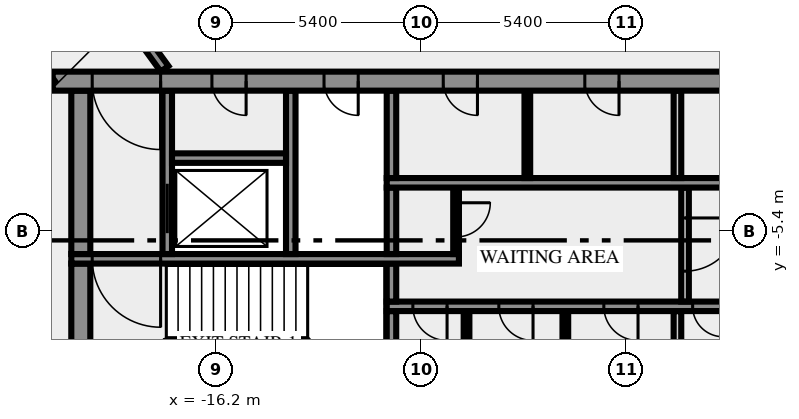
"""IFC4 building model, lengths in metres.
Left out: names, types, materials, properties, quantities, classifications, styles, units other than length and angle.
Written with IfcOpenShell. Run it as: python <this file> out.ifc"""

import sys

from ifc_helpers import new_model, si_unit, direction, frame, frame_2d, origin, place, context, subcontext, project, spatial, rectangle, extrude, element, fill, save


model = new_model("IFC4")
c1 = context("Model", 3, precision=1e-05, world=origin(), true_north=direction((0.0, 1.0)))
c2 = subcontext(c1, "Body", "Model", "MODEL_VIEW")
j1 = project(units=[si_unit("LENGTHUNIT", "METRE"), si_unit("PLANEANGLEUNIT", "RADIAN")], contexts=[c1])
p1 = place(None, origin())
s1 = spatial("IfcSite", under=j1, at=p1, CompositionType="ELEMENT")
p2 = place(p1, origin())
s2 = spatial("IfcBuilding", under=s1, at=p2, CompositionType="ELEMENT")
p3 = place(p2, frame((0.0, 0.0, 148.0)))
s3 = spatial("IfcBuildingStorey", under=s2, at=p3, CompositionType="ELEMENT", Elevation=148.0)
p4 = place(p3, frame((-19.75, -10.5, 0.0), z_axis=(0.0, 0.0, 1.0), x_axis=(0.0, 1.0, 0.0)))
e1 = element("IfcWall", 1, at=p4, inside=s3, PredefinedType="SHEAR", context=c2, shape_type="SweptSolid", body=[
    extrude(rectangle(XDim=4.25, YDim=0.5, at=frame_2d((2.125, 0.0))), origin(), (0.0, 0.0, 1.0), 3.65),
])
p5 = place(p3, frame((-11.575, -10.5, 0.0), z_axis=(0.0, 0.0, 1.0), x_axis=(0.0, 1.0, 0.0)))
e2 = element("IfcWall", 2, at=p5, inside=s3, PredefinedType="SHEAR", context=c2, shape_type="SweptSolid", body=[
    extrude(rectangle(XDim=3.0, YDim=0.25, at=frame_2d((1.5, 0.0))), origin(), (0.0, 0.0, 1.0), 3.65),
])
for number, where, z_axis, x_axis in (
    (3, (-9.6, -10.5, 0.0), (0.0, 0.0, 1.0), (0.0, 1.0, 0.0)),
    (4, (-7.0, -10.5, 0.0), (0.0, 0.0, 1.0), (0.0, 1.0, 0.0)),
):
    element("IfcWall", number, at=place(p3, frame(where, z_axis=z_axis, x_axis=x_axis)), inside=s3, PredefinedType="PARTITIONING", context=c2, shape_type="SweptSolid", body=[
        extrude(rectangle(XDim=3.0, YDim=0.15, at=frame_2d((1.5, 0.0))), origin(), (0.0, 0.0, 1.0), 3.65),
    ])
p6 = place(p3, frame((-4.05, -10.5, 0.0), z_axis=(0.0, 0.0, 1.0), x_axis=(0.0, 1.0, 0.0)))
e5 = element("IfcWall", 5, at=p6, inside=s3, PredefinedType="SOLIDWALL", context=c2, shape_type="SweptSolid", body=[
    extrude(rectangle(XDim=3.0, YDim=0.2, at=frame_2d((1.5, 0.0))), origin(), (0.0, 0.0, 1.0), 3.65),
])
p7 = place(p3, frame((11.7, -7.375, 0.0), z_axis=(0.0, 0.0, 1.0), x_axis=(-1.0, 0.0, 0.0)))
e6 = element("IfcWall", 6, at=p7, inside=s3, PredefinedType="SHEAR", context=c2, shape_type="SweptSolid", body=[
    extrude(rectangle(XDim=23.4, YDim=0.25, at=frame_2d((11.7, 0.0))), origin(), (0.0, 0.0, 1.0), 3.65),
])
p8 = place(p7, frame((21.812, 0.0, 0.0)))
e7 = element("IfcOpeningElement", 7, at=p8, cuts=e6, PredefinedType="OPENING", context=c2, shape_type="SweptSolid", body=[
    extrude(rectangle(XDim=0.9, YDim=2.1, at=frame_2d((0.45, 1.05))), frame((0.0, 0.135, 0.0), z_axis=(0.0, -1.0, 0.0), x_axis=(1.0, 0.0, 0.0)), (0.0, 0.0, 1.0), 0.27),
])
p9 = place(p7, frame((19.55, 0.0, 0.0)))
e8 = element("IfcOpeningElement", 8, at=p9, cuts=e6, PredefinedType="OPENING", context=c2, shape_type="SweptSolid", body=[
    extrude(rectangle(XDim=0.9, YDim=2.1, at=frame_2d((0.45, 1.05))), frame((0.0, 0.135, 0.0), z_axis=(0.0, -1.0, 0.0), x_axis=(1.0, 0.0, 0.0)), (0.0, 0.0, 1.0), 0.27),
])
p10 = place(p7, frame((16.787, 0.0, 0.0)))
e9 = element("IfcOpeningElement", 9, at=p10, cuts=e6, PredefinedType="OPENING", context=c2, shape_type="SweptSolid", body=[
    extrude(rectangle(XDim=0.9, YDim=2.1, at=frame_2d((0.45, 1.05))), frame((0.0, 0.135, 0.0), z_axis=(0.0, -1.0, 0.0), x_axis=(1.0, 0.0, 0.0)), (0.0, 0.0, 1.0), 0.27),
])
p11 = place(p7, frame((14.55, 0.0, 0.0)))
e10 = element("IfcOpeningElement", 10, at=p11, cuts=e6, PredefinedType="OPENING", context=c2, shape_type="SweptSolid", body=[
    extrude(rectangle(XDim=0.8, YDim=2.1, at=frame_2d((0.4, 1.05))), frame((0.0, 0.135, 0.0), z_axis=(0.0, -1.0, 0.0), x_axis=(1.0, 0.0, 0.0)), (0.0, 0.0, 1.0), 0.27),
])
p12 = place(p7, frame((12.8, 0.0, 0.0)))
e11 = element("IfcOpeningElement", 11, at=p12, cuts=e6, PredefinedType="OPENING", context=c2, shape_type="SweptSolid", body=[
    extrude(rectangle(XDim=0.9, YDim=2.1, at=frame_2d((0.45, 1.05))), frame((0.0, 0.135, 0.0), z_axis=(0.0, -1.0, 0.0), x_axis=(1.0, 0.0, 0.0)), (0.0, 0.0, 1.0), 0.27),
])
p13 = place(p7, frame((10.7, 0.0, 0.0)))
e12 = element("IfcOpeningElement", 12, at=p13, cuts=e6, PredefinedType="OPENING", context=c2, shape_type="SweptSolid", body=[
    extrude(rectangle(XDim=0.9, YDim=2.1, at=frame_2d((0.45, 1.05))), frame((0.0, 0.135, 0.0), z_axis=(0.0, -1.0, 0.0), x_axis=(1.0, 0.0, 0.0)), (0.0, 0.0, 1.0), 0.27),
])
p14 = place(p7, frame((8.35, 0.0, 0.0)))
e13 = element("IfcOpeningElement", 13, at=p14, cuts=e6, PredefinedType="OPENING", context=c2, shape_type="SweptSolid", body=[
    extrude(rectangle(XDim=1.1, YDim=2.1, at=frame_2d((0.55, 1.05))), frame((0.0, 0.135, 0.0), z_axis=(0.0, -1.0, 0.0), x_axis=(1.0, 0.0, 0.0)), (0.0, 0.0, 1.0), 0.27),
])
p15 = place(p7, frame((5.85, 0.0, 0.0)))
e14 = element("IfcOpeningElement", 14, at=p15, cuts=e6, PredefinedType="OPENING", context=c2, shape_type="SweptSolid", body=[
    extrude(rectangle(XDim=1.1, YDim=2.1, at=frame_2d((0.55, 1.05))), frame((0.0, 0.135, 0.0), z_axis=(0.0, -1.0, 0.0), x_axis=(1.0, 0.0, 0.0)), (0.0, 0.0, 1.0), 0.27),
])
p16 = place(p7, frame((3.35, 0.0, 0.0)))
e15 = element("IfcOpeningElement", 15, at=p16, cuts=e6, PredefinedType="OPENING", context=c2, shape_type="SweptSolid", body=[
    extrude(rectangle(XDim=1.1, YDim=2.1, at=frame_2d((0.55, 1.05))), frame((0.0, 0.135, 0.0), z_axis=(0.0, -1.0, 0.0), x_axis=(1.0, 0.0, 0.0)), (0.0, 0.0, 1.0), 0.27),
])
p17 = place(p7, frame((0.85, 0.0, 0.0)))
e16 = element("IfcOpeningElement", 16, at=p17, cuts=e6, PredefinedType="OPENING", context=c2, shape_type="SweptSolid", body=[
    extrude(rectangle(XDim=1.1, YDim=2.1, at=frame_2d((0.55, 1.05))), frame((0.0, 0.135, 0.0), z_axis=(0.0, -1.0, 0.0), x_axis=(1.0, 0.0, 0.0)), (0.0, 0.0, 1.0), 0.27),
])
p18 = place(p3, frame((-11.575, -7.25, 0.0), z_axis=(0.0, 0.0, 1.0), x_axis=(0.0, 1.0, 0.0)))
e17 = element("IfcWall", 17, at=p18, inside=s3, PredefinedType="SHEAR", context=c2, shape_type="SweptSolid", body=[
    extrude(rectangle(XDim=1.0, YDim=0.25, at=frame_2d((0.5, 0.0))), origin(), (0.0, 0.0, 1.0), 3.65),
])
p19 = place(p3, frame((-3.85, -4.25, 0.0), z_axis=(0.0, 0.0, 1.0), x_axis=(0.0, -1.0, 0.0)))
e18 = element("IfcWall", 18, at=p19, inside=s3, PredefinedType="SOLIDWALL", context=c2, shape_type="SweptSolid", body=[
    extrude(rectangle(XDim=3.0, YDim=0.2, at=frame_2d((1.5, 0.0))), origin(), (0.0, 0.0, 1.0), 3.65),
])
p20 = place(p19, frame((0.8, 0.0, 0.0)))
e19 = element("IfcOpeningElement", 19, at=p20, cuts=e18, PredefinedType="OPENING", context=c2, shape_type="SweptSolid", body=[
    extrude(rectangle(XDim=1.4, YDim=2.1, at=frame_2d((0.7, 1.05))), frame((0.0, 0.11, 0.0), z_axis=(0.0, -1.0, 0.0), x_axis=(1.0, 0.0, 0.0)), (0.0, 0.0, 1.0), 0.22),
])
p21 = place(p3, frame((-9.8, -6.125, 0.0), z_axis=(0.0, 0.0, 1.0), x_axis=(-1.0, 0.0, 0.0)))
e20 = element("IfcWall", 20, at=p21, inside=s3, PredefinedType="SHEAR", context=c2, shape_type="SweptSolid", body=[
    extrude(rectangle(XDim=10.2, YDim=0.25, at=frame_2d((5.1, 0.0))), origin(), (0.0, 0.0, 1.0), 3.65),
])
p22 = place(p21, frame((7.85, 0.0, 0.0)))
e21 = element("IfcOpeningElement", 21, at=p22, cuts=e20, PredefinedType="OPENING", context=c2, shape_type="SweptSolid", body=[
    extrude(rectangle(XDim=1.8, YDim=2.1, at=frame_2d((0.9, 1.05))), frame((0.0, 0.135, 0.0), z_axis=(0.0, -1.0, 0.0), x_axis=(1.0, 0.0, 0.0)), (0.0, 0.0, 1.0), 0.27),
])
p23 = place(p3, frame((-19.75, -6.0, 0.0), z_axis=(0.0, 0.0, 1.0), x_axis=(0.0, 1.0, 0.0)))
e22 = element("IfcWall", 22, at=p23, inside=s3, PredefinedType="SHEAR", context=c2, shape_type="SweptSolid", body=[
    extrude(rectangle(XDim=4.3, YDim=0.5, at=frame_2d((2.15, 0.0))), origin(), (0.0, 0.0, 1.0), 3.65),
])
p24 = place(p3, frame((-17.475, -6.0, 0.0), z_axis=(0.0, 0.0, 1.0), x_axis=(0.0, 1.0, 0.0)))
e23 = element("IfcWall", 23, at=p24, inside=s3, PredefinedType="SHEAR", context=c2, shape_type="SweptSolid", body=[
    extrude(rectangle(XDim=4.3, YDim=0.25, at=frame_2d((2.15, 0.0))), origin(), (0.0, 0.0, 1.0), 3.65),
])
p25 = place(p24, frame((0.55, 0.0, 0.0)))
e24 = element("IfcOpeningElement", 24, at=p25, cuts=e23, PredefinedType="OPENING", context=c2, shape_type="SweptSolid", body=[
    extrude(rectangle(XDim=1.3, YDim=2.1, at=frame_2d((0.65, 1.05))), frame((0.0, 0.135, 0.0), z_axis=(0.0, -1.0, 0.0), x_axis=(1.0, 0.0, 0.0)), (0.0, 0.0, 1.0), 0.27),
])
p26 = place(p3, frame((-14.225, -6.0, 0.0), z_axis=(0.0, 0.0, 1.0), x_axis=(0.0, 1.0, 0.0)))
e25 = element("IfcWall", 25, at=p26, inside=s3, PredefinedType="SHEAR", context=c2, shape_type="SweptSolid", body=[
    extrude(rectangle(XDim=4.3, YDim=0.25, at=frame_2d((2.15, 0.0))), origin(), (0.0, 0.0, 1.0), 3.65),
])
p27 = place(p3, frame((-11.575, -6.0, 0.0), z_axis=(0.0, 0.0, 1.0), x_axis=(0.0, 1.0, 0.0)))
e26 = element("IfcWall", 26, at=p27, inside=s3, PredefinedType="SHEAR", context=c2, shape_type="SweptSolid", body=[
    extrude(rectangle(XDim=1.75, YDim=0.25, at=frame_2d((0.875, 0.0))), origin(), (0.0, 0.0, 1.0), 3.65),
])
p28 = place(p3, frame((-9.875, -4.25, 0.0), z_axis=(0.0, 0.0, 1.0), x_axis=(0.0, -1.0, 0.0)))
e27 = element("IfcWall", 27, at=p28, inside=s3, PredefinedType="PARTITIONING", context=c2, shape_type="SweptSolid", body=[
    extrude(rectangle(XDim=1.75, YDim=0.15, at=frame_2d((0.875, 0.0))), origin(), (0.0, 0.0, 1.0), 3.65),
])
p29 = place(p28, frame((0.4, 0.0, 0.0)))
e28 = element("IfcOpeningElement", 28, at=p29, cuts=e27, PredefinedType="OPENING", context=c2, shape_type="SweptSolid", body=[
    extrude(rectangle(XDim=0.9, YDim=2.1, at=frame_2d((0.45, 1.05))), frame((0.0, 0.085, 0.0), z_axis=(0.0, -1.0, 0.0), x_axis=(1.0, 0.0, 0.0)), (0.0, 0.0, 1.0), 0.17),
])
p30 = place(p3, frame((-11.7, -4.125, 0.0), z_axis=(0.0, 0.0, 1.0), x_axis=(1.0, 0.0, 0.0)))
e29 = element("IfcWall", 29, at=p30, inside=s3, PredefinedType="SHEAR", context=c2, shape_type="SweptSolid", body=[
    extrude(rectangle(XDim=10.05, YDim=0.25, at=frame_2d((5.025, 0.0))), origin(), (0.0, 0.0, 1.0), 3.65),
])
p31 = place(p3, frame((-11.575, -4.0, 0.0), z_axis=(0.0, 0.0, 1.0), x_axis=(0.0, 1.0, 0.0)))
e30 = element("IfcWall", 30, at=p31, inside=s3, PredefinedType="SHEAR", context=c2, shape_type="SweptSolid", body=[
    extrude(rectangle(XDim=2.3, YDim=0.25, at=frame_2d((1.15, 0.0))), origin(), (0.0, 0.0, 1.0), 3.65),
])
p32 = place(p3, frame((-8.0, -4.0, 0.0), z_axis=(0.0, 0.0, 1.0), x_axis=(0.0, 1.0, 0.0)))
e31 = element("IfcWall", 31, at=p32, inside=s3, PredefinedType="PARTITIONING", context=c2, shape_type="SweptSolid", body=[
    extrude(rectangle(XDim=2.3, YDim=0.15, at=frame_2d((1.15, 0.0))), origin(), (0.0, 0.0, 1.0), 3.65),
])
p33 = place(p3, frame((-4.05, -4.0, 0.0), z_axis=(0.0, 0.0, 1.0), x_axis=(0.0, 1.0, 0.0)))
e32 = element("IfcWall", 32, at=p33, inside=s3, PredefinedType="SOLIDWALL", context=c2, shape_type="SweptSolid", body=[
    extrude(rectangle(XDim=2.3, YDim=0.2, at=frame_2d((1.15, 0.0))), origin(), (0.0, 0.0, 1.0), 3.65),
])
p34 = place(p3, frame((-17.35, -3.475, 0.0), z_axis=(0.0, 0.0, 1.0), x_axis=(1.0, 0.0, 0.0)))
e33 = element("IfcWall", 33, at=p34, inside=s3, PredefinedType="SHEAR", context=c2, shape_type="SweptSolid", body=[
    extrude(rectangle(XDim=3.0, YDim=0.25, at=frame_2d((1.5, 0.0))), origin(), (0.0, 0.0, 1.0), 3.65),
])
p35 = place(p3, frame((20.49, -1.45, 0.0), z_axis=(0.0, 0.0, 1.0), x_axis=(-1.0, 0.0, 0.0)))
e34 = element("IfcWall", 34, at=p35, inside=s3, PredefinedType="SHEAR", context=c2, shape_type="SweptSolid", body=[
    extrude(rectangle(XDim=40.98, YDim=0.5, at=frame_2d((20.49, 0.0))), origin(), (0.0, 0.0, 1.0), 3.65),
])
p36 = place(p35, frame((38.14, 0.0, 0.0)))
e35 = element("IfcOpeningElement", 35, at=p36, cuts=e34, PredefinedType="OPENING", context=c2, shape_type="SweptSolid", body=[
    extrude(rectangle(XDim=1.8, YDim=2.1, at=frame_2d((0.9, 1.05))), frame((0.0, 0.26, 0.0), z_axis=(0.0, -1.0, 0.0), x_axis=(1.0, 0.0, 0.0)), (0.0, 0.0, 1.0), 0.52),
])
p37 = place(p35, frame((35.89, 0.0, 0.0)))
e36 = element("IfcOpeningElement", 36, at=p37, cuts=e34, PredefinedType="OPENING", context=c2, shape_type="SweptSolid", body=[
    extrude(rectangle(XDim=0.9, YDim=2.1, at=frame_2d((0.45, 1.05))), frame((0.0, 0.26, 0.0), z_axis=(0.0, -1.0, 0.0), x_axis=(1.0, 0.0, 0.0)), (0.0, 0.0, 1.0), 0.52),
])
p38 = place(p35, frame((32.94, 0.0, 0.0)))
e37 = element("IfcOpeningElement", 37, at=p38, cuts=e34, PredefinedType="OPENING", context=c2, shape_type="SweptSolid", body=[
    extrude(rectangle(XDim=0.9, YDim=2.1, at=frame_2d((0.45, 1.05))), frame((0.0, 0.26, 0.0), z_axis=(0.0, -1.0, 0.0), x_axis=(1.0, 0.0, 0.0)), (0.0, 0.0, 1.0), 0.52),
])
p39 = place(p35, frame((29.802, 0.0, 0.0)))
e38 = element("IfcOpeningElement", 38, at=p39, cuts=e34, PredefinedType="OPENING", context=c2, shape_type="SweptSolid", body=[
    extrude(rectangle(XDim=0.9, YDim=2.1, at=frame_2d((0.45, 1.05))), frame((0.0, 0.26, 0.0), z_axis=(0.0, -1.0, 0.0), x_axis=(1.0, 0.0, 0.0)), (0.0, 0.0, 1.0), 0.52),
])
p40 = place(p35, frame((26.077, 0.0, 0.0)))
e39 = element("IfcOpeningElement", 39, at=p40, cuts=e34, PredefinedType="OPENING", context=c2, shape_type="SweptSolid", body=[
    extrude(rectangle(XDim=0.9, YDim=2.1, at=frame_2d((0.45, 1.05))), frame((0.0, 0.26, 0.0), z_axis=(0.0, -1.0, 0.0), x_axis=(1.0, 0.0, 0.0)), (0.0, 0.0, 1.0), 0.52),
])
p41 = place(p35, frame((19.59, 0.0, 0.0)))
e40 = element("IfcOpeningElement", 40, at=p41, cuts=e34, PredefinedType="OPENING", context=c2, shape_type="SweptSolid", body=[
    extrude(rectangle(XDim=2.0, YDim=2.1, at=frame_2d((1.0, 1.05))), frame((0.0, 0.26, 0.0), z_axis=(0.0, -1.0, 0.0), x_axis=(1.0, 0.0, 0.0)), (0.0, 0.0, 1.0), 0.52),
])
p42 = place(p35, frame((7.14, 0.0, 0.0)))
e41 = element("IfcOpeningElement", 41, at=p42, cuts=e34, PredefinedType="OPENING", context=c2, shape_type="SweptSolid", body=[
    extrude(rectangle(XDim=0.9, YDim=2.1, at=frame_2d((0.45, 1.05))), frame((0.0, 0.26, 0.0), z_axis=(0.0, -1.0, 0.0), x_axis=(1.0, 0.0, 0.0)), (0.0, 0.0, 1.0), 0.52),
])
p43 = place(p35, frame((5.028, 0.0, 0.0)))
e42 = element("IfcOpeningElement", 42, at=p43, cuts=e34, PredefinedType="OPENING", context=c2, shape_type="SweptSolid", body=[
    extrude(rectangle(XDim=0.8, YDim=2.1, at=frame_2d((0.4, 1.05))), frame((0.0, 0.26, 0.0), z_axis=(0.0, -1.0, 0.0), x_axis=(1.0, 0.0, 0.0)), (0.0, 0.0, 1.0), 0.52),
])
p44 = place(p35, frame((3.452, 0.0, 0.0)))
e43 = element("IfcOpeningElement", 43, at=p44, cuts=e34, PredefinedType="OPENING", context=c2, shape_type="SweptSolid", body=[
    extrude(rectangle(XDim=0.8, YDim=2.1, at=frame_2d((0.4, 1.05))), frame((0.0, 0.26, 0.0), z_axis=(0.0, -1.0, 0.0), x_axis=(1.0, 0.0, 0.0)), (0.0, 0.0, 1.0), 0.52),
])
p45 = place(p35, frame((1.04, 0.0, 0.0)))
e44 = element("IfcOpeningElement", 44, at=p45, cuts=e34, PredefinedType="OPENING", context=c2, shape_type="SweptSolid", body=[
    extrude(rectangle(XDim=1.8, YDim=2.1, at=frame_2d((0.9, 1.05))), frame((0.0, 0.26, 0.0), z_axis=(0.0, -1.0, 0.0), x_axis=(1.0, 0.0, 0.0)), (0.0, 0.0, 1.0), 0.52),
])
p46 = place(p3, frame((-20.531, -1.523, 0.0), z_axis=(0.0, 0.0, 1.0), x_axis=(-0.587785812891, 0.809016587076, 0.0)))
e45 = element("IfcWall", 45, at=p46, inside=s3, PredefinedType="SOLIDWALL", context=c2, shape_type="SweptSolid", body=[
    extrude(rectangle(XDim=28.67, YDim=0.25, at=frame_2d((14.335, 0.0))), origin(), (0.0, 0.0, 1.0), 3.65),
])
p47 = place(p46, frame((27.296, 0.0, 0.0)))
e46 = element("IfcOpeningElement", 46, at=p47, cuts=e45, PredefinedType="OPENING", context=c2, shape_type="SweptSolid", body=[
    extrude(rectangle(XDim=0.9, YDim=2.1, at=frame_2d((0.45, 1.05))), frame((0.0, 0.135, 0.0), z_axis=(0.0, -1.0, 0.0), x_axis=(1.0, 0.0, 0.0)), (0.0, 0.0, 1.0), 0.27),
])
p48 = place(p46, frame((11.866, 0.0, 0.0)))
e47 = element("IfcOpeningElement", 47, at=p48, cuts=e45, PredefinedType="OPENING", context=c2, shape_type="SweptSolid", body=[
    extrude(rectangle(XDim=0.9, YDim=2.1, at=frame_2d((0.45, 1.05))), frame((0.0, 0.135, 0.0), z_axis=(0.0, -1.0, 0.0), x_axis=(1.0, 0.0, 0.0)), (0.0, 0.0, 1.0), 0.27),
])
p49 = place(p46, frame((0.533, 0.0, 0.0)))
e48 = element("IfcOpeningElement", 48, at=p49, cuts=e45, PredefinedType="OPENING", context=c2, shape_type="SweptSolid", body=[
    extrude(rectangle(XDim=0.9, YDim=2.1, at=frame_2d((0.45, 1.05))), frame((0.0, 0.135, 0.0), z_axis=(0.0, -1.0, 0.0), x_axis=(1.0, 0.0, 0.0)), (0.0, 0.0, 1.0), 0.27),
])
p50 = place(p3, frame((-35.092, 23.027, 0.0), z_axis=(0.0, 0.0, 1.0), x_axis=(0.587784076945, -0.809017848313, 0.0)))
e49 = element("IfcWall", 49, at=p50, inside=s3, PredefinedType="SOLIDWALL", context=c2, shape_type="SweptSolid", body=[
    extrude(rectangle(XDim=29.853, YDim=0.25, at=frame_2d((14.927, 0.0))), origin(), (0.0, 0.0, 1.0), 3.65),
])
p51 = place(p50, frame((0.224, 0.0, 0.0)))
e50 = element("IfcOpeningElement", 50, at=p51, cuts=e49, PredefinedType="OPENING", context=c2, shape_type="SweptSolid", body=[
    extrude(rectangle(XDim=0.9, YDim=2.1, at=frame_2d((0.45, 1.05))), frame((0.0, 0.135, 0.0), z_axis=(0.0, -1.0, 0.0), x_axis=(1.0, 0.0, 0.0)), (0.0, 0.0, 1.0), 0.27),
])
p52 = place(p50, frame((25.512, 0.0, 0.0)))
e51 = element("IfcOpeningElement", 51, at=p52, cuts=e49, PredefinedType="OPENING", context=c2, shape_type="SweptSolid", body=[
    extrude(rectangle(XDim=0.9, YDim=2.1, at=frame_2d((0.45, 1.05))), frame((0.0, 0.135, 0.0), z_axis=(0.0, -1.0, 0.0), x_axis=(1.0, 0.0, 0.0)), (0.0, 0.0, 1.0), 0.27),
])
p53 = place(p8, origin())
e52 = element("IfcDoor", 52, at=p53, inside=s3, OperationType="SINGLE_SWING_RIGHT", PredefinedType="DOOR", context=c2, shape_type="SweptSolid", body=[
    extrude(rectangle(XDim=0.9, YDim=2.1, at=frame_2d((0.45, 1.05))), frame((0.0, 0.025, 0.0), z_axis=(0.0, -1.0, 0.0), x_axis=(1.0, 0.0, 0.0)), (0.0, 0.0, 1.0), 0.05),
])
fill(e7, e52)
p54 = place(p9, origin())
e53 = element("IfcDoor", 53, at=p54, inside=s3, OperationType="SINGLE_SWING_RIGHT", PredefinedType="DOOR", context=c2, shape_type="SweptSolid", body=[
    extrude(rectangle(XDim=0.9, YDim=2.1, at=frame_2d((0.45, 1.05))), frame((0.0, 0.025, 0.0), z_axis=(0.0, -1.0, 0.0), x_axis=(1.0, 0.0, 0.0)), (0.0, 0.0, 1.0), 0.05),
])
fill(e8, e53)
p55 = place(p10, origin())
e54 = element("IfcDoor", 54, at=p55, inside=s3, OperationType="SINGLE_SWING_RIGHT", PredefinedType="DOOR", context=c2, shape_type="SweptSolid", body=[
    extrude(rectangle(XDim=0.9, YDim=2.1, at=frame_2d((0.45, 1.05))), frame((0.0, 0.025, 0.0), z_axis=(0.0, -1.0, 0.0), x_axis=(1.0, 0.0, 0.0)), (0.0, 0.0, 1.0), 0.05),
])
fill(e9, e54)
p56 = place(p11, origin())
e55 = element("IfcDoor", 55, at=p56, inside=s3, OperationType="SINGLE_SWING_RIGHT", PredefinedType="DOOR", context=c2, shape_type="SweptSolid", body=[
    extrude(rectangle(XDim=0.8, YDim=2.1, at=frame_2d((0.4, 1.05))), frame((0.0, 0.025, 0.0), z_axis=(0.0, -1.0, 0.0), x_axis=(1.0, 0.0, 0.0)), (0.0, 0.0, 1.0), 0.05),
])
fill(e10, e55)
p57 = place(p20, origin())
e56 = element("IfcDoor", 56, at=p57, inside=s3, OperationType="DOUBLE_DOOR_SINGLE_SWING", PredefinedType="DOOR", context=c2, shape_type="SweptSolid", body=[
    extrude(rectangle(XDim=1.4, YDim=2.1, at=frame_2d((0.7, 1.05))), frame((0.0, 0.025, 0.0), z_axis=(0.0, -1.0, 0.0), x_axis=(1.0, 0.0, 0.0)), (0.0, 0.0, 1.0), 0.05),
])
fill(e19, e56)
p58 = place(p22, origin())
e57 = element("IfcDoor", 57, at=p58, inside=s3, OperationType="DOUBLE_DOOR_SINGLE_SWING", PredefinedType="DOOR", context=c2, shape_type="SweptSolid", body=[
    extrude(rectangle(XDim=1.8, YDim=2.1, at=frame_2d((0.9, 1.05))), frame((0.0, 0.025, 0.0), z_axis=(0.0, -1.0, 0.0), x_axis=(1.0, 0.0, 0.0)), (0.0, 0.0, 1.0), 0.05),
])
fill(e21, e57)
p59 = place(p25, origin())
e58 = element("IfcDoor", 58, at=p59, inside=s3, OperationType="DOUBLE_DOOR_SLIDING", PredefinedType="DOOR", context=c2, shape_type="SweptSolid", body=[
    extrude(rectangle(XDim=1.3, YDim=2.1, at=frame_2d((0.65, 1.05))), frame((0.0, 0.025, 0.0), z_axis=(0.0, -1.0, 0.0), x_axis=(1.0, 0.0, 0.0)), (0.0, 0.0, 1.0), 0.05),
])
fill(e24, e58)
p60 = place(p29, origin())
e59 = element("IfcDoor", 59, at=p60, inside=s3, OperationType="SINGLE_SWING_LEFT", PredefinedType="DOOR", context=c2, shape_type="SweptSolid", body=[
    extrude(rectangle(XDim=0.9, YDim=2.1, at=frame_2d((0.45, 1.05))), frame((0.0, 0.025, 0.0), z_axis=(0.0, -1.0, 0.0), x_axis=(1.0, 0.0, 0.0)), (0.0, 0.0, 1.0), 0.05),
])
fill(e28, e59)
p61 = place(p36, origin())
e60 = element("IfcDoor", 60, at=p61, inside=s3, OperationType="DOUBLE_DOOR_SINGLE_SWING", PredefinedType="DOOR", context=c2, shape_type="SweptSolid", body=[
    extrude(rectangle(XDim=1.8, YDim=2.1, at=frame_2d((0.9, 1.05))), frame((0.0, 0.025, 0.0), z_axis=(0.0, -1.0, 0.0), x_axis=(1.0, 0.0, 0.0)), (0.0, 0.0, 1.0), 0.05),
])
fill(e35, e60)
p62 = place(p37, origin())
e61 = element("IfcDoor", 61, at=p62, inside=s3, OperationType="SINGLE_SWING_RIGHT", PredefinedType="DOOR", context=c2, shape_type="SweptSolid", body=[
    extrude(rectangle(XDim=0.9, YDim=2.1, at=frame_2d((0.45, 1.05))), frame((0.0, 0.025, 0.0), z_axis=(0.0, -1.0, 0.0), x_axis=(1.0, 0.0, 0.0)), (0.0, 0.0, 1.0), 0.05),
])
fill(e36, e61)
p63 = place(p38, origin())
e62 = element("IfcDoor", 62, at=p63, inside=s3, OperationType="SINGLE_SWING_RIGHT", PredefinedType="DOOR", context=c2, shape_type="SweptSolid", body=[
    extrude(rectangle(XDim=0.9, YDim=2.1, at=frame_2d((0.45, 1.05))), frame((0.0, 0.025, 0.0), z_axis=(0.0, -1.0, 0.0), x_axis=(1.0, 0.0, 0.0)), (0.0, 0.0, 1.0), 0.05),
])
fill(e37, e62)
p64 = place(p39, origin())
e63 = element("IfcDoor", 63, at=p64, inside=s3, OperationType="SINGLE_SWING_RIGHT", PredefinedType="DOOR", context=c2, shape_type="SweptSolid", body=[
    extrude(rectangle(XDim=0.9, YDim=2.1, at=frame_2d((0.45, 1.05))), frame((0.0, 0.025, 0.0), z_axis=(0.0, -1.0, 0.0), x_axis=(1.0, 0.0, 0.0)), (0.0, 0.0, 1.0), 0.05),
])
fill(e38, e63)
p65 = place(p40, origin())
e64 = element("IfcDoor", 64, at=p65, inside=s3, OperationType="SINGLE_SWING_RIGHT", PredefinedType="DOOR", context=c2, shape_type="SweptSolid", body=[
    extrude(rectangle(XDim=0.9, YDim=2.1, at=frame_2d((0.45, 1.05))), frame((0.0, 0.025, 0.0), z_axis=(0.0, -1.0, 0.0), x_axis=(1.0, 0.0, 0.0)), (0.0, 0.0, 1.0), 0.05),
])
fill(e39, e64)
save(model, sys.argv[1])
